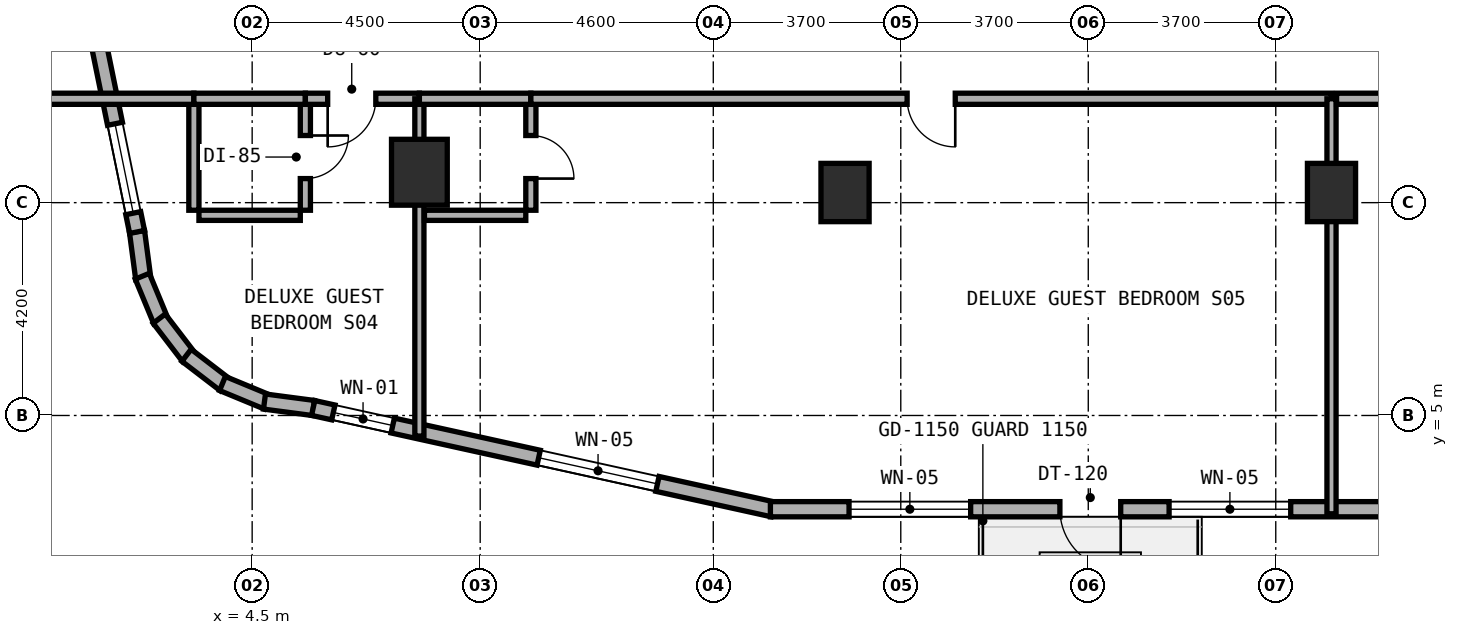
"""IFC4 building model, lengths in metres.
Left out: names, types, materials, properties, quantities, classifications, styles, units other than length and angle.
Written with IfcOpenShell. Run it as: python <this file> out.ifc"""

import sys

from ifc_helpers import new_model, si_unit, direction, frame, frame_2d, origin, origin_2d, place, context, subcontext, project, spatial, rectangle, extrude, element, fill, save


model = new_model("IFC4")
c1 = context("Model", 3, precision=1e-05, world=origin(), true_north=direction((0.0, 1.0)))
c2 = subcontext(c1, "Body", "Model", "MODEL_VIEW")
j1 = project(units=[si_unit("LENGTHUNIT", "METRE"), si_unit("PLANEANGLEUNIT", "RADIAN")], contexts=[c1])
p1 = place(None, origin())
s1 = spatial("IfcSite", under=j1, at=p1, CompositionType="ELEMENT")
p2 = place(p1, origin())
s2 = spatial("IfcBuilding", under=s1, at=p2, CompositionType="ELEMENT")
p3 = place(p2, frame((0.0, 0.0, 27.5)))
s3 = spatial("IfcBuildingStorey", under=s2, at=p3, CompositionType="ELEMENT", Elevation=27.5)
for number, where, z_axis, x_axis in (
    (1, (16.2, 9.4, 0.0), (0.0, 0.0, 1.0), (1.0, 0.0, 0.0)),
    (2, (25.8, 9.4, 0.0), (0.0, 0.0, 1.0), (1.0, 0.0, 0.0)),
):
    element("IfcColumn", number, at=place(p3, frame(where, z_axis=z_axis, x_axis=x_axis)), inside=s3, PredefinedType="COLUMN", context=c2, shape_type="SweptSolid", body=[
        extrude(rectangle(XDim=0.95, YDim=1.15, at=origin_2d()), origin(), (0.0, 0.0, 1.0), 3.5),
    ])
p4 = place(p3, frame((7.8, 9.8, 0.0), z_axis=(0.0, 0.0, 1.0), x_axis=(1.0, 0.0, 0.0)))
e3 = element("IfcColumn", 3, at=p4, inside=s3, PredefinedType="COLUMN", context=c2, shape_type="SweptSolid", body=[
    extrude(rectangle(XDim=1.1, YDim=1.3, at=origin_2d()), origin(), (0.0, 0.0, 1.0), 3.5),
])
p5 = place(p3, frame((2.228, 8.628, 0.0), z_axis=(0.0, 0.0, 1.0), x_axis=(0.131174864804, -0.991359246108, 0.0)))
e4 = element("IfcWall", 4, at=p5, inside=s3, PredefinedType="STANDARD", context=c2, shape_type="SweptSolid", body=[
    extrude(rectangle(XDim=0.938, YDim=0.3, at=frame_2d((0.469, 0.0))), origin(), (0.0, 0.0, 1.0), 3.22),
])
p6 = place(p3, frame((2.332, 7.748, 0.0), z_axis=(0.0, 0.0, 1.0), x_axis=(0.382344263057, -0.924019948111, 0.0)))
e5 = element("IfcWall", 5, at=p6, inside=s3, PredefinedType="STANDARD", context=c2, shape_type="SweptSolid", body=[
    extrude(rectangle(XDim=0.955, YDim=0.3, at=frame_2d((0.477, 0.0))), origin(), (0.0, 0.0, 1.0), 3.22),
])
for number, where, z_axis, x_axis in (
    (6, (2.666, 6.911, 0.0), (0.0, 0.0, 1.0), (0.608, -0.794, 0.0)),
    (7, (3.205, 6.188, 0.0), (0.0, 0.0, 1.0), (0.794, -0.608, 0.0)),
):
    element("IfcWall", number, at=place(p3, frame(where, z_axis=z_axis, x_axis=x_axis)), inside=s3, PredefinedType="STANDARD", context=c2, shape_type="SweptSolid", body=[
        extrude(rectangle(XDim=0.955, YDim=0.3, at=frame_2d((0.478, 0.0))), origin(), (0.0, 0.0, 1.0), 3.22),
    ])
p7 = place(p3, frame((3.914, 5.631, 0.0), z_axis=(0.0, 0.0, 1.0), x_axis=(0.923982547689, -0.382434636986, 0.0)))
e8 = element("IfcWall", 8, at=p7, inside=s3, PredefinedType="STANDARD", context=c2, shape_type="SweptSolid", body=[
    extrude(rectangle(XDim=0.954, YDim=0.3, at=frame_2d((0.477, 0.0))), origin(), (0.0, 0.0, 1.0), 3.22),
])
p8 = place(p3, frame((4.743, 5.275, 0.0), z_axis=(0.0, 0.0, 1.0), x_axis=(0.99145856342, -0.130422072598, 0.0)))
e9 = element("IfcWall", 9, at=p8, inside=s3, PredefinedType="STANDARD", context=c2, shape_type="SweptSolid", body=[
    extrude(rectangle(XDim=0.973, YDim=0.3, at=frame_2d((0.487, 0.0))), origin(), (0.0, 0.0, 1.0), 3.22),
])
p9 = place(p3, frame((5.704, 5.148, 0.0), z_axis=(0.0, 0.0, 1.0), x_axis=(0.976539545934, -0.215338141596, 0.0)))
e10 = element("IfcWall", 10, at=p9, inside=s3, PredefinedType="STANDARD", context=c2, shape_type="SweptSolid", body=[
    extrude(rectangle(XDim=9.288, YDim=0.3, at=frame_2d((4.644, 0.0))), origin(), (0.0, 0.0, 1.0), 3.22),
])
p10 = place(p9, frame((0.408, 0.0, 0.85)))
e11 = element("IfcOpeningElement", 11, at=p10, cuts=e10, PredefinedType="OPENING", context=c2, shape_type="SweptSolid", body=[
    extrude(rectangle(XDim=1.2, YDim=1.5, at=frame_2d((0.6, 0.75))), frame((0.0, 0.16, 0.0), z_axis=(0.0, -1.0, 0.0), x_axis=(1.0, 0.0, 0.0)), (0.0, 0.0, 1.0), 0.32),
])
p11 = place(p9, frame((4.557, 0.0, 0.8)))
e12 = element("IfcOpeningElement", 12, at=p11, cuts=e10, PredefinedType="OPENING", context=c2, shape_type="SweptSolid", body=[
    extrude(rectangle(XDim=2.4, YDim=1.6, at=frame_2d((1.2, 0.8))), frame((0.0, 0.16, 0.0), z_axis=(0.0, -1.0, 0.0), x_axis=(1.0, 0.0, 0.0)), (0.0, 0.0, 1.0), 0.32),
])
p12 = place(p3, frame((14.727, 3.15, 0.0), z_axis=(0.0, 0.0, 1.0), x_axis=(1.0, 0.0, 0.0)))
e13 = element("IfcWall", 13, at=p12, inside=s3, PredefinedType="STANDARD", context=c2, shape_type="SweptSolid", body=[
    extrude(rectangle(XDim=12.591, YDim=0.3, at=frame_2d((6.295, 0.0))), origin(), (0.0, 0.0, 1.0), 3.22),
])
p13 = place(p12, frame((5.713, 0.0, 0.0)))
e14 = element("IfcOpeningElement", 14, at=p13, cuts=e13, PredefinedType="OPENING", context=c2, shape_type="SweptSolid", body=[
    extrude(rectangle(XDim=1.2, YDim=2.15, at=frame_2d((0.6, 1.075))), frame((0.0, 0.16, 0.0), z_axis=(0.0, -1.0, 0.0), x_axis=(1.0, 0.0, 0.0)), (0.0, 0.0, 1.0), 0.32),
])
p14 = place(p12, frame((1.552, 0.0, 0.8)))
e15 = element("IfcOpeningElement", 15, at=p14, cuts=e13, PredefinedType="OPENING", context=c2, shape_type="SweptSolid", body=[
    extrude(rectangle(XDim=2.4, YDim=1.6, at=frame_2d((1.2, 0.8))), frame((0.0, 0.16, 0.0), z_axis=(0.0, -1.0, 0.0), x_axis=(1.0, 0.0, 0.0)), (0.0, 0.0, 1.0), 0.32),
])
p15 = place(p12, frame((7.868, 0.0, 0.8)))
e16 = element("IfcOpeningElement", 16, at=p15, cuts=e13, PredefinedType="OPENING", context=c2, shape_type="SweptSolid", body=[
    extrude(rectangle(XDim=2.4, YDim=1.6, at=frame_2d((1.2, 0.8))), frame((0.0, 0.16, 0.0), z_axis=(0.0, -1.0, 0.0), x_axis=(1.0, 0.0, 0.0)), (0.0, 0.0, 1.0), 0.32),
])
p16 = place(p3, frame((0.216, 18.484, 0.0), z_axis=(0.0, 0.0, 1.0), x_axis=(0.199990901713, -0.979797754249, 0.0)))
e17 = element("IfcWall", 17, at=p16, inside=s3, PredefinedType="STANDARD", context=c2, shape_type="SweptSolid", body=[
    extrude(rectangle(XDim=10.065, YDim=0.3, at=frame_2d((5.033, 0.0))), origin(), (0.0, 0.0, 1.0), 3.22),
])
p17 = place(p16, frame((2.429, 0.0, 0.8)))
e18 = element("IfcOpeningElement", 18, at=p17, cuts=e17, PredefinedType="OPENING", context=c2, shape_type="SweptSolid", body=[
    extrude(rectangle(XDim=2.4, YDim=1.6, at=frame_2d((1.2, 0.8))), frame((0.0, 0.16, 0.0), z_axis=(0.0, -1.0, 0.0), x_axis=(1.0, 0.0, 0.0)), (0.0, 0.0, 1.0), 0.32),
])
p18 = place(p16, frame((7.887, 0.0, 0.85)))
e19 = element("IfcOpeningElement", 19, at=p18, cuts=e17, PredefinedType="OPENING", context=c2, shape_type="SweptSolid", body=[
    extrude(rectangle(XDim=1.8, YDim=1.5, at=frame_2d((0.9, 0.75))), frame((0.0, 0.16, 0.0), z_axis=(0.0, -1.0, 0.0), x_axis=(1.0, 0.0, 0.0)), (0.0, 0.0, 1.0), 0.32),
])
p19 = place(p3, frame((5.55, 9.05, 0.0), z_axis=(0.0, 0.0, 1.0), x_axis=(0.0, 1.0, 0.0)))
e20 = element("IfcWall", 20, at=p19, inside=s3, PredefinedType="PLUMBINGWALL", context=c2, shape_type="SweptSolid", body=[
    extrude(rectangle(XDim=2.1, YDim=0.2, at=frame_2d((1.05, 0.0))), origin(), (0.0, 0.0, 1.0), 3.22),
])
p20 = place(p19, frame((0.625, 0.0, 0.0)))
e21 = element("IfcOpeningElement", 21, at=p20, cuts=e20, PredefinedType="OPENING", context=c2, shape_type="SweptSolid", body=[
    extrude(rectangle(XDim=0.85, YDim=2.1, at=frame_2d((0.425, 1.05))), frame((0.0, 0.11, 0.0), z_axis=(0.0, -1.0, 0.0), x_axis=(1.0, 0.0, 0.0)), (0.0, 0.0, 1.0), 0.22),
])
p21 = place(p3, frame((3.45, 8.95, 0.0), z_axis=(0.0, 0.0, 1.0), x_axis=(1.0, 0.0, 0.0)))
e22 = element("IfcWall", 22, at=p21, inside=s3, PredefinedType="PLUMBINGWALL", context=c2, shape_type="SweptSolid", body=[
    extrude(rectangle(XDim=2.0, YDim=0.2, at=frame_2d((1.0, 0.0))), origin(), (0.0, 0.0, 1.0), 3.22),
])
p22 = place(p3, frame((3.35, 9.05, 0.0), z_axis=(0.0, 0.0, 1.0), x_axis=(0.0, 1.0, 0.0)))
e23 = element("IfcWall", 23, at=p22, inside=s3, PredefinedType="PLUMBINGWALL", context=c2, shape_type="SweptSolid", body=[
    extrude(rectangle(XDim=2.1, YDim=0.2, at=frame_2d((1.05, 0.0))), origin(), (0.0, 0.0, 1.0), 3.22),
])
p23 = place(p3, frame((0.24, 11.25, 0.0), z_axis=(0.0, 0.0, 1.0), x_axis=(1.0, 0.0, 0.0)))
e24 = element("IfcWall", 24, at=p23, inside=s3, PredefinedType="SOLIDWALL", context=c2, shape_type="SweptSolid", body=[
    extrude(rectangle(XDim=3.11, YDim=0.22, at=frame_2d((1.555, 0.0))), origin(), (0.0, 0.0, 1.0), 3.22),
])
p24 = place(p3, frame((3.35, 11.25, 0.0), z_axis=(0.0, 0.0, 1.0), x_axis=(1.0, 0.0, 0.0)))
e25 = element("IfcWall", 25, at=p24, inside=s3, PredefinedType="SOLIDWALL", context=c2, shape_type="SweptSolid", body=[
    extrude(rectangle(XDim=2.2, YDim=0.22, at=frame_2d((1.1, 0.0))), origin(), (0.0, 0.0, 1.0), 3.22),
])
p25 = place(p3, frame((5.55, 11.25, 0.0), z_axis=(0.0, 0.0, 1.0), x_axis=(1.0, 0.0, 0.0)))
e26 = element("IfcWall", 26, at=p25, inside=s3, PredefinedType="SOLIDWALL", context=c2, shape_type="SweptSolid", body=[
    extrude(rectangle(XDim=2.25, YDim=0.22, at=frame_2d((1.125, 0.0))), origin(), (0.0, 0.0, 1.0), 2.395),
])
p26 = place(p25, frame((0.44, 0.0, 0.0)))
e27 = element("IfcOpeningElement", 27, at=p26, cuts=e26, PredefinedType="OPENING", context=c2, shape_type="SweptSolid", body=[
    extrude(rectangle(XDim=0.95, YDim=2.1, at=frame_2d((0.475, 1.05))), frame((0.0, 0.12, 0.0), z_axis=(0.0, -1.0, 0.0), x_axis=(1.0, 0.0, 0.0)), (0.0, 0.0, 1.0), 0.24),
])
p27 = place(p3, frame((7.8, 4.594, 0.0), z_axis=(0.0, 0.0, 1.0), x_axis=(0.0, 1.0, 0.0)))
e28 = element("IfcWall", 28, at=p27, inside=s3, PredefinedType="SOLIDWALL", context=c2, shape_type="SweptSolid", body=[
    extrude(rectangle(XDim=6.656, YDim=0.18, at=frame_2d((3.328, 0.0))), origin(), (0.0, 0.0, 1.0), 2.395),
])
p28 = place(p3, frame((10.0, 9.05, 0.0), z_axis=(0.0, 0.0, 1.0), x_axis=(0.0, 1.0, 0.0)))
e29 = element("IfcWall", 29, at=p28, inside=s3, PredefinedType="PLUMBINGWALL", context=c2, shape_type="SweptSolid", body=[
    extrude(rectangle(XDim=2.1, YDim=0.2, at=frame_2d((1.05, 0.0))), origin(), (0.0, 0.0, 1.0), 2.745),
])
p29 = place(p28, frame((0.625, 0.0, 0.0)))
e30 = element("IfcOpeningElement", 30, at=p29, cuts=e29, PredefinedType="OPENING", context=c2, shape_type="SweptSolid", body=[
    extrude(rectangle(XDim=0.85, YDim=2.1, at=frame_2d((0.425, 1.05))), frame((0.0, 0.11, 0.0), z_axis=(0.0, -1.0, 0.0), x_axis=(1.0, 0.0, 0.0)), (0.0, 0.0, 1.0), 0.22),
])
p30 = place(p3, frame((7.9, 8.95, 0.0), z_axis=(0.0, 0.0, 1.0), x_axis=(1.0, 0.0, 0.0)))
e31 = element("IfcWall", 31, at=p30, inside=s3, PredefinedType="PLUMBINGWALL", context=c2, shape_type="SweptSolid", body=[
    extrude(rectangle(XDim=2.0, YDim=0.2, at=frame_2d((1.0, 0.0))), origin(), (0.0, 0.0, 1.0), 3.22),
])
p31 = place(p3, frame((7.8, 11.25, 0.0), z_axis=(0.0, 0.0, 1.0), x_axis=(1.0, 0.0, 0.0)))
e32 = element("IfcWall", 32, at=p31, inside=s3, PredefinedType="SOLIDWALL", context=c2, shape_type="SweptSolid", body=[
    extrude(rectangle(XDim=2.2, YDim=0.22, at=frame_2d((1.1, 0.0))), origin(), (0.0, 0.0, 1.0), 2.395),
])
p32 = place(p3, frame((10.0, 11.25, 0.0), z_axis=(0.0, 0.0, 1.0), x_axis=(1.0, 0.0, 0.0)))
e33 = element("IfcWall", 33, at=p32, inside=s3, PredefinedType="SOLIDWALL", context=c2, shape_type="SweptSolid", body=[
    extrude(rectangle(XDim=15.8, YDim=0.22, at=frame_2d((7.9, 0.0))), origin(), (0.0, 0.0, 1.0), 2.395),
])
p33 = place(p32, frame((7.425, 0.0, 0.0)))
e34 = element("IfcOpeningElement", 34, at=p33, cuts=e33, PredefinedType="OPENING", context=c2, shape_type="SweptSolid", body=[
    extrude(rectangle(XDim=0.95, YDim=2.1, at=frame_2d((0.475, 1.05))), frame((0.0, 0.12, 0.0), z_axis=(0.0, -1.0, 0.0), x_axis=(1.0, 0.0, 0.0)), (0.0, 0.0, 1.0), 0.24),
])
p34 = place(p3, frame((25.8, 3.06, 0.0), z_axis=(0.0, 0.0, 1.0), x_axis=(0.0, 1.0, 0.0)))
e35 = element("IfcWall", 35, at=p34, inside=s3, PredefinedType="SOLIDWALL", context=c2, shape_type="SweptSolid", body=[
    extrude(rectangle(XDim=8.19, YDim=0.18, at=frame_2d((4.095, 0.0))), origin(), (0.0, 0.0, 1.0), 2.395),
])
p35 = place(p3, frame((25.9, 11.25, 0.0), z_axis=(0.0, 0.0, 1.0), x_axis=(1.0, 0.0, 0.0)))
e36 = element("IfcWall", 36, at=p35, inside=s3, PredefinedType="SOLIDWALL", context=c2, shape_type="SweptSolid", body=[
    extrude(rectangle(XDim=15.84, YDim=0.22, at=frame_2d((7.92, 0.0))), origin(), (0.0, 0.0, 1.0), 2.395),
])
p36 = place(p35, frame((6.411, 0.0, 0.0)))
e37 = element("IfcOpeningElement", 37, at=p36, cuts=e36, PredefinedType="OPENING", context=c2, shape_type="SweptSolid", body=[
    extrude(rectangle(XDim=0.95, YDim=2.1, at=frame_2d((0.475, 1.05))), frame((0.0, 0.12, 0.0), z_axis=(0.0, -1.0, 0.0), x_axis=(1.0, 0.0, 0.0)), (0.0, 0.0, 1.0), 0.24),
])
p37 = place(p10, origin())
e38 = element("IfcWindow", 38, at=p37, inside=s3, PartitioningType="SINGLE_PANEL", PredefinedType="WINDOW", context=c2, shape_type="SweptSolid", body=[
    extrude(rectangle(XDim=1.2, YDim=1.5, at=frame_2d((0.6, 0.75))), frame((0.0, 0.03, 0.0), z_axis=(0.0, -1.0, 0.0), x_axis=(1.0, 0.0, 0.0)), (0.0, 0.0, 1.0), 0.06),
])
fill(e11, e38)
p38 = place(p11, origin())
e39 = element("IfcWindow", 39, at=p38, inside=s3, PartitioningType="SINGLE_PANEL", PredefinedType="WINDOW", context=c2, shape_type="SweptSolid", body=[
    extrude(rectangle(XDim=2.4, YDim=1.6, at=frame_2d((1.2, 0.8))), frame((0.0, 0.03, 0.0), z_axis=(0.0, -1.0, 0.0), x_axis=(1.0, 0.0, 0.0)), (0.0, 0.0, 1.0), 0.06),
])
fill(e12, e39)
p39 = place(p13, frame((1.2, 0.0, 0.0), z_axis=(0.0, 0.0, 1.0), x_axis=(-1.0, 0.0, 0.0)))
e40 = element("IfcDoor", 40, at=p39, inside=s3, OperationType="SINGLE_SWING_LEFT", PredefinedType="DOOR", context=c2, shape_type="SweptSolid", body=[
    extrude(rectangle(XDim=1.2, YDim=2.15, at=frame_2d((0.6, 1.075))), frame((0.0, 0.025, 0.0), z_axis=(0.0, -1.0, 0.0), x_axis=(1.0, 0.0, 0.0)), (0.0, 0.0, 1.0), 0.05),
])
fill(e14, e40)
p40 = place(p14, origin())
e41 = element("IfcWindow", 41, at=p40, inside=s3, PartitioningType="SINGLE_PANEL", PredefinedType="WINDOW", context=c2, shape_type="SweptSolid", body=[
    extrude(rectangle(XDim=2.4, YDim=1.6, at=frame_2d((1.2, 0.8))), frame((0.0, 0.03, 0.0), z_axis=(0.0, -1.0, 0.0), x_axis=(1.0, 0.0, 0.0)), (0.0, 0.0, 1.0), 0.06),
])
fill(e15, e41)
p41 = place(p15, origin())
e42 = element("IfcWindow", 42, at=p41, inside=s3, PartitioningType="SINGLE_PANEL", PredefinedType="WINDOW", context=c2, shape_type="SweptSolid", body=[
    extrude(rectangle(XDim=2.4, YDim=1.6, at=frame_2d((1.2, 0.8))), frame((0.0, 0.03, 0.0), z_axis=(0.0, -1.0, 0.0), x_axis=(1.0, 0.0, 0.0)), (0.0, 0.0, 1.0), 0.06),
])
fill(e16, e42)
p42 = place(p18, origin())
e43 = element("IfcWindow", 43, at=p42, inside=s3, PartitioningType="SINGLE_PANEL", PredefinedType="WINDOW", context=c2, shape_type="SweptSolid", body=[
    extrude(rectangle(XDim=1.8, YDim=1.5, at=frame_2d((0.9, 0.75))), frame((0.0, 0.03, 0.0), z_axis=(0.0, -1.0, 0.0), x_axis=(1.0, 0.0, 0.0)), (0.0, 0.0, 1.0), 0.06),
])
fill(e19, e43)
p43 = place(p20, frame((0.85, 0.0, 0.0), z_axis=(0.0, 0.0, 1.0), x_axis=(-1.0, 0.0, 0.0)))
e44 = element("IfcDoor", 44, at=p43, inside=s3, OperationType="SINGLE_SWING_LEFT", PredefinedType="DOOR", context=c2, shape_type="SweptSolid", body=[
    extrude(rectangle(XDim=0.85, YDim=2.1, at=frame_2d((0.425, 1.05))), frame((0.0, 0.025, 0.0), z_axis=(0.0, -1.0, 0.0), x_axis=(1.0, 0.0, 0.0)), (0.0, 0.0, 1.0), 0.05),
])
fill(e21, e44)
p44 = place(p26, frame((0.95, 0.0, 0.0), z_axis=(0.0, 0.0, 1.0), x_axis=(-1.0, 0.0, 0.0)))
e45 = element("IfcDoor", 45, at=p44, inside=s3, OperationType="SINGLE_SWING_RIGHT", PredefinedType="DOOR", context=c2, shape_type="SweptSolid", body=[
    extrude(rectangle(XDim=0.95, YDim=2.1, at=frame_2d((0.475, 1.05))), frame((0.0, 0.025, 0.0), z_axis=(0.0, -1.0, 0.0), x_axis=(1.0, 0.0, 0.0)), (0.0, 0.0, 1.0), 0.05),
])
fill(e27, e45)
p45 = place(p29, frame((0.85, 0.0, 0.0), z_axis=(0.0, 0.0, 1.0), x_axis=(-1.0, 0.0, 0.0)))
e46 = element("IfcDoor", 46, at=p45, inside=s3, OperationType="SINGLE_SWING_RIGHT", PredefinedType="DOOR", context=c2, shape_type="SweptSolid", body=[
    extrude(rectangle(XDim=0.85, YDim=2.1, at=frame_2d((0.425, 1.05))), frame((0.0, 0.025, 0.0), z_axis=(0.0, -1.0, 0.0), x_axis=(1.0, 0.0, 0.0)), (0.0, 0.0, 1.0), 0.05),
])
fill(e30, e46)
p46 = place(p33, frame((0.95, 0.0, 0.0), z_axis=(0.0, 0.0, 1.0), x_axis=(-1.0, 0.0, 0.0)))
e47 = element("IfcDoor", 47, at=p46, inside=s3, OperationType="SINGLE_SWING_LEFT", PredefinedType="DOOR", context=c2, shape_type="SweptSolid", body=[
    extrude(rectangle(XDim=0.95, YDim=2.1, at=frame_2d((0.475, 1.05))), frame((0.0, 0.025, 0.0), z_axis=(0.0, -1.0, 0.0), x_axis=(1.0, 0.0, 0.0)), (0.0, 0.0, 1.0), 0.05),
])
fill(e34, e47)
save(model, sys.argv[1])
